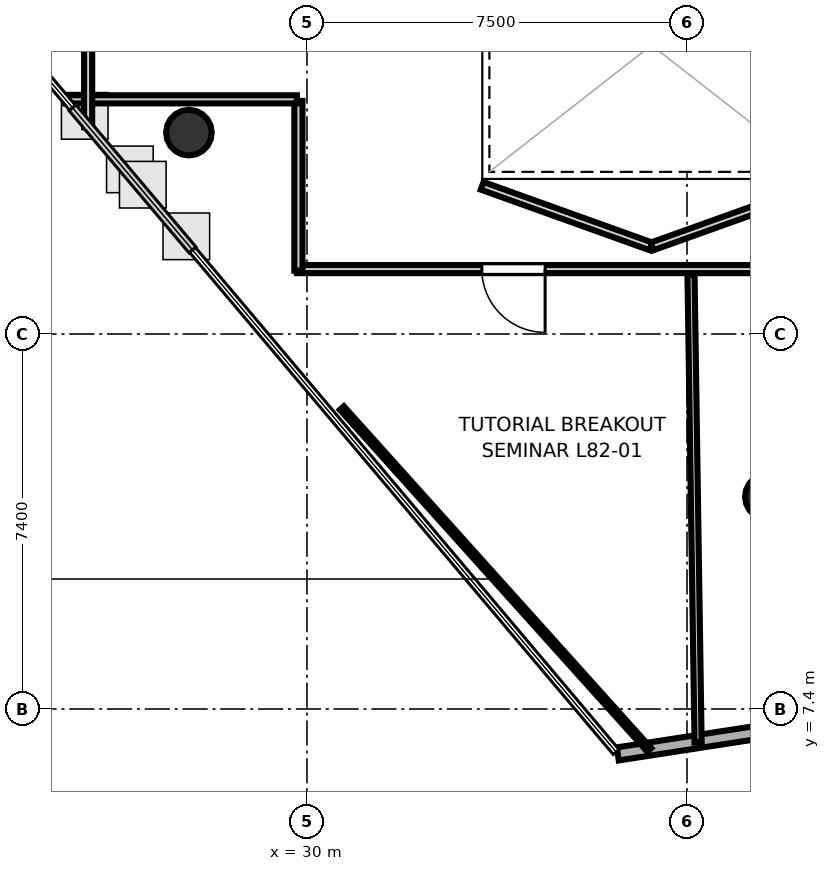
"""IFC4 building model, lengths in metres.
Left out: names, types, materials, properties, quantities, classifications, styles, units other than length and angle.
Written with IfcOpenShell. Run it as: python <this file> out.ifc"""

import sys

from ifc_helpers import new_model, si_unit, direction, frame, frame_2d, origin, origin_2d, place, context, subcontext, project, spatial, rectangle, hollow_circle, extrude, element, fill, save


model = new_model("IFC4")
c1 = context("Model", 3, precision=1e-05, world=origin(), true_north=direction((0.0, 1.0)))
c2 = subcontext(c1, "Body", "Model", "MODEL_VIEW")
j1 = project(units=[si_unit("LENGTHUNIT", "METRE"), si_unit("PLANEANGLEUNIT", "RADIAN")], contexts=[c1])
p1 = place(None, origin())
s1 = spatial("IfcSite", under=j1, at=p1, CompositionType="ELEMENT")
p2 = place(p1, origin())
s2 = spatial("IfcBuilding", under=s1, at=p2, CompositionType="ELEMENT")
p3 = place(p2, frame((0.0, 0.0, 317.6)))
s3 = spatial("IfcBuildingStorey", under=s2, at=p3, CompositionType="ELEMENT", Elevation=317.6)
for number, where, z_axis, x_axis in (
    (1, (27.67, 18.774, 0.0), (0.0, 0.0, 1.0), (1.0, 0.0, 0.0)),
    (2, (39.096, 11.588, 0.0), (0.0, 0.0, 1.0), (1.0, 0.0, 0.0)),
):
    element("IfcColumn", number, at=place(p3, frame(where, z_axis=z_axis, x_axis=x_axis)), inside=s3, PredefinedType="COLUMN", context=c2, shape_type="SweptSolid", body=[
        extrude(hollow_circle(Radius=0.45, WallThickness=0.025, at=origin_2d()), origin(), (0.0, 0.0, 1.0), 3.7),
    ])
p4 = place(p3, frame((36.134, 6.513, 0.0), z_axis=(0.0, 0.0, 1.0), x_axis=(0.98829802047, 0.152535316355, 0.0)))
e3 = element("IfcWall", 3, at=p4, inside=s3, PredefinedType="SOLIDWALL", context=c2, shape_type="SweptSolid", body=[
    extrude(rectangle(XDim=4.105, YDim=0.26, at=frame_2d((2.053, 0.0))), origin(), (0.0, 0.0, 1.0), 3.4),
])
p5 = place(p3, frame((33.458, 17.724, 0.0), z_axis=(0.0, 0.0, 1.0), x_axis=(0.94128854789, -0.337603124408, 0.0)))
e4 = element("IfcWall", 4, at=p5, inside=s3, PredefinedType="PARTITIONING", context=c2, shape_type="SweptSolid", body=[
    extrude(rectangle(XDim=3.54, YDim=0.16, at=frame_2d((1.77, 0.0))), origin(), (0.0, 0.0, 1.0), 2.72),
])
p6 = place(p3, frame((36.81, 16.529, 0.0), z_axis=(0.0, 0.0, 1.0), x_axis=(0.941548344365, 0.33687789364, 0.0)))
e5 = element("IfcWall", 5, at=p6, inside=s3, PredefinedType="PARTITIONING", context=c2, shape_type="SweptSolid", body=[
    extrude(rectangle(XDim=3.513, YDim=0.16, at=frame_2d((1.756, 0.0))), origin(), (0.0, 0.0, 1.0), 2.72),
])
p7 = place(p3, frame((42.65, 16.081, 0.0), z_axis=(0.0, 0.0, 1.0), x_axis=(-1.0, 0.0, 0.0)))
e6 = element("IfcWall", 6, at=p7, inside=s3, PredefinedType="PARTITIONING", context=c2, shape_type="SweptSolid", body=[
    extrude(rectangle(XDim=12.85, YDim=0.16, at=frame_2d((6.425, 0.0))), origin(), (0.0, 0.0, 1.0), 2.72),
])
p8 = place(p7, frame((7.95, 0.0, 0.0)))
e7 = element("IfcOpeningElement", 7, at=p8, cuts=e6, PredefinedType="OPENING", context=c2, shape_type="SweptSolid", body=[
    extrude(rectangle(XDim=1.25, YDim=2.2, at=frame_2d((0.625, 1.1))), frame((0.0, 0.09, 0.0), z_axis=(0.0, -1.0, 0.0), x_axis=(1.0, 0.0, 0.0)), (0.0, 0.0, 1.0), 0.18),
])
p9 = place(p3, frame((29.831, 16.05, 0.0), z_axis=(0.0, 0.0, 1.0), x_axis=(0.0, 1.0, 0.0)))
e8 = element("IfcWall", 8, at=p9, inside=s3, PredefinedType="PARTITIONING", context=c2, shape_type="SweptSolid", body=[
    extrude(rectangle(XDim=3.35, YDim=0.16, at=frame_2d((1.675, 0.0))), origin(), (0.0, 0.0, 1.0), 2.72),
])
p10 = place(p3, frame((29.8, 19.431, 0.0), z_axis=(0.0, 0.0, 1.0), x_axis=(-1.0, 0.0, 0.0)))
e9 = element("IfcWall", 9, at=p10, inside=s3, PredefinedType="PARTITIONING", context=c2, shape_type="SweptSolid", body=[
    extrude(rectangle(XDim=4.587, YDim=0.16, at=frame_2d((2.293, 0.0))), origin(), (0.0, 0.0, 1.0), 2.72),
])
p11 = place(p3, frame((25.681, 18.88, 0.0), z_axis=(0.0, 0.0, 1.0), x_axis=(0.0, 1.0, 0.0)))
e10 = element("IfcWall", 10, at=p11, inside=s3, PredefinedType="PARTITIONING", context=c2, shape_type="SweptSolid", body=[
    extrude(rectangle(XDim=14.754, YDim=0.16, at=frame_2d((7.377, 0.0))), origin(), (0.0, 0.0, 1.0), 2.72),
])
p12 = place(p11, frame((6.674, 0.0, 0.0)))
e11 = element("IfcOpeningElement", 11, at=p12, cuts=e10, PredefinedType="OPENING", context=c2, shape_type="SweptSolid", body=[
    extrude(rectangle(XDim=1.25, YDim=2.2, at=frame_2d((0.625, 1.1))), frame((0.0, 0.09, 0.0), z_axis=(0.0, -1.0, 0.0), x_axis=(1.0, 0.0, 0.0)), (0.0, 0.0, 1.0), 0.18),
])
p13 = place(p3, frame((36.756, 6.592, 0.0), z_axis=(0.0, 0.0, 1.0), x_axis=(-0.668688184358, 0.7435429457, 0.0)))
e12 = element("IfcWall", 12, at=p13, inside=s3, PredefinedType="PARTITIONING", context=c2, shape_type="SweptSolid", body=[
    extrude(rectangle(XDim=9.073, YDim=0.105, at=frame_2d((4.537, 0.0))), origin(), (0.0, 0.0, 1.0), 2.72),
])
p14 = place(p3, frame((37.579, 15.969, 0.0), z_axis=(0.0, 0.0, 1.0), x_axis=(0.015125342245, -0.999885605468, 0.0)))
e13 = element("IfcWall", 13, at=p14, inside=s3, PredefinedType="PARTITIONING", context=c2, shape_type="SweptSolid", body=[
    extrude(rectangle(XDim=9.233, YDim=0.14, at=frame_2d((4.616, 0.0))), origin(), (0.0, 0.0, 1.0), 2.72),
])
p15 = place(p8, origin())
e14 = element("IfcDoor", 14, at=p15, inside=s3, OperationType="SINGLE_SWING_LEFT", PredefinedType="DOOR", context=c2, shape_type="SweptSolid", body=[
    extrude(rectangle(XDim=1.25, YDim=2.2, at=frame_2d((0.625, 1.1))), frame((0.0, 0.025, 0.0), z_axis=(0.0, -1.0, 0.0), x_axis=(1.0, 0.0, 0.0)), (0.0, 0.0, 1.0), 0.05),
])
fill(e7, e14)
save(model, sys.argv[1])
